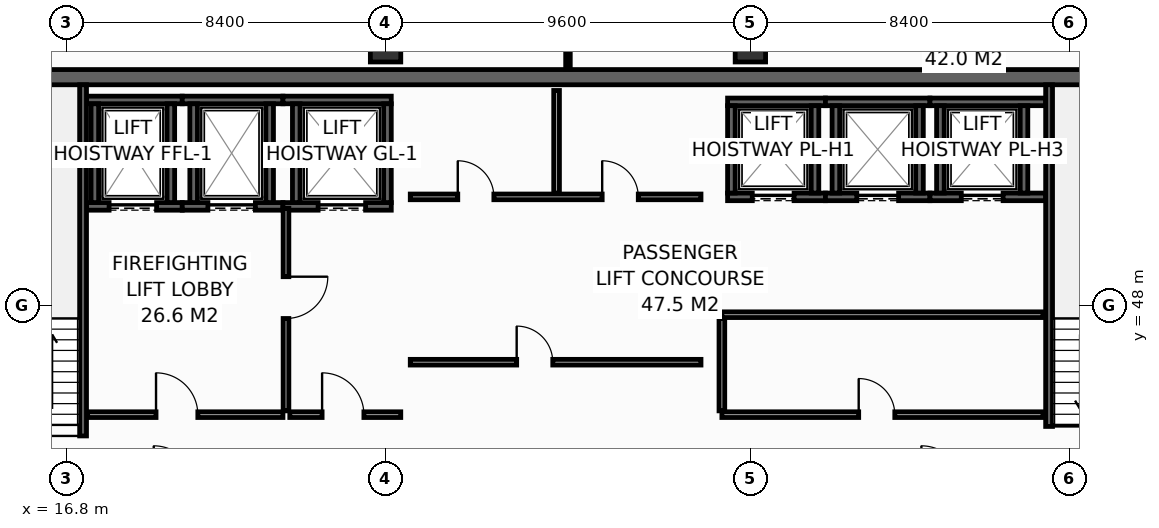
"""IFC4 building model, lengths in metres.
Left out: names, types, materials, properties, quantities, classifications, styles, units other than length and angle.
Written with IfcOpenShell. Run it as: python <this file> out.ifc"""

import sys

from ifc_helpers import new_model, si_unit, direction, frame, frame_2d, origin, origin_2d, place, context, subcontext, project, spatial, rectangle, hollow_rectangle, extrude, element, fill, save


model = new_model("IFC4")
c1 = context("Model", 3, precision=1e-05, world=origin(), true_north=direction((0.0, 1.0)))
c2 = subcontext(c1, "Body", "Model", "MODEL_VIEW")
j1 = project(units=[si_unit("LENGTHUNIT", "METRE"), si_unit("PLANEANGLEUNIT", "RADIAN")], contexts=[c1])
p1 = place(None, origin())
s1 = spatial("IfcSite", under=j1, at=p1, CompositionType="ELEMENT")
p2 = place(p1, origin())
s2 = spatial("IfcBuilding", under=s1, at=p2, CompositionType="ELEMENT")
p3 = place(p2, frame((0.0, 0.0, 245.8)))
s3 = spatial("IfcBuildingStorey", under=s2, at=p3, CompositionType="ELEMENT", Elevation=245.8)
p4 = place(p3, frame((13.7, 54.0, 0.0), z_axis=(0.0, 0.0, 1.0), x_axis=(1.0, 0.0, 0.0)))
e1 = element("IfcWall", 1, at=p4, inside=s3, PredefinedType="SHEAR", context=c2, shape_type="SweptSolid", body=[
    extrude(rectangle(XDim=32.5, YDim=0.4, at=frame_2d((16.25, 0.0))), origin(), (0.0, 0.0, 1.0), 3.55),
])
for number, where, z_axis, x_axis in (
    (2, (25.2, 54.8, 0.0), (0.0, 0.0, 1.0), (1.0, 0.0, 0.0)),
    (3, (34.8, 54.8, 0.0), (0.0, 0.0, 1.0), (1.0, 0.0, 0.0)),
):
    element("IfcColumn", number, at=place(p3, frame(where, z_axis=z_axis, x_axis=x_axis)), inside=s3, PredefinedType="COLUMN", context=c2, shape_type="SweptSolid", body=[
        extrude(hollow_rectangle(XDim=0.8, YDim=0.8, WallThickness=0.036, at=origin_2d()), origin(), (0.0, 0.0, 1.0), 3.8),
    ])
p5 = place(p3, frame((17.33, 50.6, 0.0), z_axis=(0.0, 0.0, 1.0), x_axis=(1.0, 0.0, 0.0)))
e4 = element("IfcWall", 4, at=p5, inside=s3, PredefinedType="SHEAR", context=c2, shape_type="SweptSolid", body=[
    extrude(rectangle(XDim=2.52, YDim=0.2, at=frame_2d((1.26, 0.0))), origin(), (0.0, 0.0, 1.0), 3.55),
])
p6 = place(p5, frame((0.595, 0.0, 0.0)))
e5 = element("IfcOpeningElement", 5, at=p6, cuts=e4, PredefinedType="OPENING", context=c2, shape_type="SweptSolid", body=[
    extrude(rectangle(XDim=1.25, YDim=2.3, at=frame_2d((0.625, 1.15))), frame((0.0, 0.11, 0.0), z_axis=(0.0, -1.0, 0.0), x_axis=(1.0, 0.0, 0.0)), (0.0, 0.0, 1.0), 0.22),
])
p7 = place(p3, frame((17.33, 53.4, 0.0), z_axis=(0.0, 0.0, 1.0), x_axis=(1.0, 0.0, 0.0)))
e6 = element("IfcWall", 6, at=p7, inside=s3, PredefinedType="SHEAR", context=c2, shape_type="SweptSolid", body=[
    extrude(rectangle(XDim=2.52, YDim=0.2, at=frame_2d((1.26, 0.0))), origin(), (0.0, 0.0, 1.0), 3.55),
])
for number, where, z_axis, x_axis in (
    (7, (17.55, 50.7, 0.0), (0.0, 0.0, 1.0), (0.0, 1.0, 0.0)),
    (8, (19.55, 50.7, 0.0), (0.0, 0.0, 1.0), (0.0, 1.0, 0.0)),
):
    element("IfcWall", number, at=place(p3, frame(where, z_axis=z_axis, x_axis=x_axis)), inside=s3, PredefinedType="SHEAR", context=c2, shape_type="SweptSolid", body=[
        extrude(rectangle(XDim=2.6, YDim=0.2, at=frame_2d((1.3, 0.0))), origin(), (0.0, 0.0, 1.0), 3.55),
    ])
p8 = place(p3, frame((19.85, 50.6, 0.0), z_axis=(0.0, 0.0, 1.0), x_axis=(1.0, 0.0, 0.0)))
e9 = element("IfcWall", 9, at=p8, inside=s3, PredefinedType="SHEAR", context=c2, shape_type="SweptSolid", body=[
    extrude(rectangle(XDim=2.65, YDim=0.2, at=frame_2d((1.325, 0.0))), origin(), (0.0, 0.0, 1.0), 3.55),
])
p9 = place(p8, frame((0.675, 0.0, 0.0)))
e10 = element("IfcOpeningElement", 10, at=p9, cuts=e9, PredefinedType="OPENING", context=c2, shape_type="SweptSolid", body=[
    extrude(rectangle(XDim=1.25, YDim=2.3, at=frame_2d((0.625, 1.15))), frame((0.0, 0.11, 0.0), z_axis=(0.0, -1.0, 0.0), x_axis=(1.0, 0.0, 0.0)), (0.0, 0.0, 1.0), 0.22),
])
p10 = place(p3, frame((19.85, 53.4, 0.0), z_axis=(0.0, 0.0, 1.0), x_axis=(1.0, 0.0, 0.0)))
e11 = element("IfcWall", 11, at=p10, inside=s3, PredefinedType="SHEAR", context=c2, shape_type="SweptSolid", body=[
    extrude(rectangle(XDim=2.65, YDim=0.2, at=frame_2d((1.325, 0.0))), origin(), (0.0, 0.0, 1.0), 3.55),
])
for number, where, z_axis, x_axis in (
    (12, (20.15, 50.7, 0.0), (0.0, 0.0, 1.0), (0.0, 1.0, 0.0)),
    (13, (22.15, 50.7, 0.0), (0.0, 0.0, 1.0), (0.0, 1.0, 0.0)),
):
    element("IfcWall", number, at=place(p3, frame(where, z_axis=z_axis, x_axis=x_axis)), inside=s3, PredefinedType="SHEAR", context=c2, shape_type="SweptSolid", body=[
        extrude(rectangle(XDim=2.6, YDim=0.2, at=frame_2d((1.3, 0.0))), origin(), (0.0, 0.0, 1.0), 3.55),
    ])
p11 = place(p3, frame((22.5, 50.6, 0.0), z_axis=(0.0, 0.0, 1.0), x_axis=(1.0, 0.0, 0.0)))
e14 = element("IfcWall", 14, at=p11, inside=s3, PredefinedType="SHEAR", context=c2, shape_type="SweptSolid", body=[
    extrude(rectangle(XDim=2.85, YDim=0.2, at=frame_2d((1.425, 0.0))), origin(), (0.0, 0.0, 1.0), 3.55),
])
p12 = place(p11, frame((0.925, 0.0, 0.0)))
e15 = element("IfcOpeningElement", 15, at=p12, cuts=e14, PredefinedType="OPENING", context=c2, shape_type="SweptSolid", body=[
    extrude(rectangle(XDim=1.25, YDim=2.3, at=frame_2d((0.625, 1.15))), frame((0.0, 0.11, 0.0), z_axis=(0.0, -1.0, 0.0), x_axis=(1.0, 0.0, 0.0)), (0.0, 0.0, 1.0), 0.22),
])
p13 = place(p3, frame((22.5, 53.4, 0.0), z_axis=(0.0, 0.0, 1.0), x_axis=(1.0, 0.0, 0.0)))
e16 = element("IfcWall", 16, at=p13, inside=s3, PredefinedType="SHEAR", context=c2, shape_type="SweptSolid", body=[
    extrude(rectangle(XDim=2.85, YDim=0.2, at=frame_2d((1.425, 0.0))), origin(), (0.0, 0.0, 1.0), 3.55),
])
for number, where, z_axis, x_axis in (
    (17, (22.85, 50.7, 0.0), (0.0, 0.0, 1.0), (0.0, 1.0, 0.0)),
    (18, (25.25, 50.7, 0.0), (0.0, 0.0, 1.0), (0.0, 1.0, 0.0)),
):
    element("IfcWall", number, at=place(p3, frame(where, z_axis=z_axis, x_axis=x_axis)), inside=s3, PredefinedType="SHEAR", context=c2, shape_type="SweptSolid", body=[
        extrude(rectangle(XDim=2.6, YDim=0.2, at=frame_2d((1.3, 0.0))), origin(), (0.0, 0.0, 1.0), 3.55),
    ])
p14 = place(p3, frame((34.2, 50.85, 0.0), z_axis=(0.0, 0.0, 1.0), x_axis=(1.0, 0.0, 0.0)))
e19 = element("IfcWall", 19, at=p14, inside=s3, PredefinedType="SHEAR", context=c2, shape_type="SweptSolid", body=[
    extrude(rectangle(XDim=2.575, YDim=0.2, at=frame_2d((1.288, 0.0))), origin(), (0.0, 0.0, 1.0), 3.55),
])
p15 = place(p14, frame((0.65, 0.0, 0.0)))
e20 = element("IfcOpeningElement", 20, at=p15, cuts=e19, PredefinedType="OPENING", context=c2, shape_type="SweptSolid", body=[
    extrude(rectangle(XDim=1.1, YDim=2.2, at=frame_2d((0.55, 1.1))), frame((0.0, 0.11, 0.0), z_axis=(0.0, -1.0, 0.0), x_axis=(1.0, 0.0, 0.0)), (0.0, 0.0, 1.0), 0.22),
])
p16 = place(p3, frame((34.2, 53.35, 0.0), z_axis=(0.0, 0.0, 1.0), x_axis=(1.0, 0.0, 0.0)))
e21 = element("IfcWall", 21, at=p16, inside=s3, PredefinedType="SHEAR", context=c2, shape_type="SweptSolid", body=[
    extrude(rectangle(XDim=2.575, YDim=0.2, at=frame_2d((1.288, 0.0))), origin(), (0.0, 0.0, 1.0), 3.55),
])
for number, where, z_axis, x_axis in (
    (22, (34.3, 50.95, 0.0), (0.0, 0.0, 1.0), (0.0, 1.0, 0.0)),
    (23, (36.5, 50.95, 0.0), (0.0, 0.0, 1.0), (0.0, 1.0, 0.0)),
):
    element("IfcWall", number, at=place(p3, frame(where, z_axis=z_axis, x_axis=x_axis)), inside=s3, PredefinedType="SHEAR", context=c2, shape_type="SweptSolid", body=[
        extrude(rectangle(XDim=2.3, YDim=0.2, at=frame_2d((1.15, 0.0))), origin(), (0.0, 0.0, 1.0), 3.55),
    ])
p17 = place(p3, frame((36.775, 50.85, 0.0), z_axis=(0.0, 0.0, 1.0), x_axis=(1.0, 0.0, 0.0)))
e24 = element("IfcWall", 24, at=p17, inside=s3, PredefinedType="SHEAR", context=c2, shape_type="SweptSolid", body=[
    extrude(rectangle(XDim=2.75, YDim=0.2, at=frame_2d((1.375, 0.0))), origin(), (0.0, 0.0, 1.0), 3.55),
])
p18 = place(p17, frame((0.825, 0.0, 0.0)))
e25 = element("IfcOpeningElement", 25, at=p18, cuts=e24, PredefinedType="OPENING", context=c2, shape_type="SweptSolid", body=[
    extrude(rectangle(XDim=1.1, YDim=2.2, at=frame_2d((0.55, 1.1))), frame((0.0, 0.11, 0.0), z_axis=(0.0, -1.0, 0.0), x_axis=(1.0, 0.0, 0.0)), (0.0, 0.0, 1.0), 0.22),
])
p19 = place(p3, frame((36.775, 53.35, 0.0), z_axis=(0.0, 0.0, 1.0), x_axis=(1.0, 0.0, 0.0)))
e26 = element("IfcWall", 26, at=p19, inside=s3, PredefinedType="SHEAR", context=c2, shape_type="SweptSolid", body=[
    extrude(rectangle(XDim=2.75, YDim=0.2, at=frame_2d((1.375, 0.0))), origin(), (0.0, 0.0, 1.0), 3.55),
])
for number, where, z_axis, x_axis in (
    (27, (37.05, 50.95, 0.0), (0.0, 0.0, 1.0), (0.0, 1.0, 0.0)),
    (28, (39.25, 50.95, 0.0), (0.0, 0.0, 1.0), (0.0, 1.0, 0.0)),
):
    element("IfcWall", number, at=place(p3, frame(where, z_axis=z_axis, x_axis=x_axis)), inside=s3, PredefinedType="SHEAR", context=c2, shape_type="SweptSolid", body=[
        extrude(rectangle(XDim=2.3, YDim=0.2, at=frame_2d((1.15, 0.0))), origin(), (0.0, 0.0, 1.0), 3.55),
    ])
p20 = place(p3, frame((39.525, 50.85, 0.0), z_axis=(0.0, 0.0, 1.0), x_axis=(1.0, 0.0, 0.0)))
e29 = element("IfcWall", 29, at=p20, inside=s3, PredefinedType="SHEAR", context=c2, shape_type="SweptSolid", body=[
    extrude(rectangle(XDim=3.045, YDim=0.2, at=frame_2d((1.522, 0.0))), origin(), (0.0, 0.0, 1.0), 3.55),
])
p21 = place(p20, frame((0.825, 0.0, 0.0)))
e30 = element("IfcOpeningElement", 30, at=p21, cuts=e29, PredefinedType="OPENING", context=c2, shape_type="SweptSolid", body=[
    extrude(rectangle(XDim=1.1, YDim=2.2, at=frame_2d((0.55, 1.1))), frame((0.0, 0.11, 0.0), z_axis=(0.0, -1.0, 0.0), x_axis=(1.0, 0.0, 0.0)), (0.0, 0.0, 1.0), 0.22),
])
p22 = place(p3, frame((39.525, 53.35, 0.0), z_axis=(0.0, 0.0, 1.0), x_axis=(1.0, 0.0, 0.0)))
e31 = element("IfcWall", 31, at=p22, inside=s3, PredefinedType="SHEAR", context=c2, shape_type="SweptSolid", body=[
    extrude(rectangle(XDim=3.045, YDim=0.2, at=frame_2d((1.522, 0.0))), origin(), (0.0, 0.0, 1.0), 3.55),
])
for number, where, z_axis, x_axis in (
    (32, (39.8, 50.95, 0.0), (0.0, 0.0, 1.0), (0.0, 1.0, 0.0)),
    (33, (42.0, 50.95, 0.0), (0.0, 0.0, 1.0), (0.0, 1.0, 0.0)),
):
    element("IfcWall", number, at=place(p3, frame(where, z_axis=z_axis, x_axis=x_axis)), inside=s3, PredefinedType="SHEAR", context=c2, shape_type="SweptSolid", body=[
        extrude(rectangle(XDim=2.3, YDim=0.2, at=frame_2d((1.15, 0.0))), origin(), (0.0, 0.0, 1.0), 3.55),
    ])
p23 = place(p3, frame((17.24, 43.4, 0.0), z_axis=(0.0, 0.0, 1.0), x_axis=(0.0, 1.0, 0.0)))
e34 = element("IfcWall", 34, at=p23, inside=s3, PredefinedType="SHEAR", context=c2, shape_type="SweptSolid", body=[
    extrude(rectangle(XDim=10.4, YDim=0.18, at=frame_2d((5.2, 0.0))), origin(), (0.0, 0.0, 1.0), 3.55),
])
p24 = place(p23, frame((0.16, 0.0, 0.0)))
e35 = element("IfcOpeningElement", 35, at=p24, cuts=e34, PredefinedType="OPENING", context=c2, shape_type="SweptSolid", body=[
    extrude(rectangle(XDim=1.0, YDim=2.15, at=frame_2d((0.5, 1.075))), frame((0.0, 0.1, 0.0), z_axis=(0.0, -1.0, 0.0), x_axis=(1.0, 0.0, 0.0)), (0.0, 0.0, 1.0), 0.2),
])
p25 = place(p3, frame((42.66, 53.8, 0.0), z_axis=(0.0, 0.0, 1.0), x_axis=(0.0, -1.0, 0.0)))
e36 = element("IfcWall", 36, at=p25, inside=s3, PredefinedType="SHEAR", context=c2, shape_type="SweptSolid", body=[
    extrude(rectangle(XDim=10.4, YDim=0.18, at=frame_2d((5.2, 0.0))), origin(), (0.0, 0.0, 1.0), 3.55),
])
p26 = place(p25, frame((8.99, 0.0, 0.0)))
e37 = element("IfcOpeningElement", 37, at=p26, cuts=e36, PredefinedType="OPENING", context=c2, shape_type="SweptSolid", body=[
    extrude(rectangle(XDim=1.1, YDim=2.15, at=frame_2d((0.55, 1.075))), frame((0.0, 0.1, 0.0), z_axis=(0.0, -1.0, 0.0), x_axis=(1.0, 0.0, 0.0)), (0.0, 0.0, 1.0), 0.2),
])
p27 = place(p3, frame((17.36, 45.12, 0.0), z_axis=(0.0, 0.0, 1.0), x_axis=(1.0, 0.0, 0.0)))
e38 = element("IfcWall", 38, at=p27, inside=s3, PredefinedType="PARTITIONING", context=c2, shape_type="SweptSolid", body=[
    extrude(rectangle(XDim=5.14, YDim=0.15, at=frame_2d((2.57, 0.0))), origin(), (0.0, 0.0, 1.0), 3.55),
])
p28 = place(p27, frame((1.8, 0.0, 0.0)))
e39 = element("IfcOpeningElement", 39, at=p28, cuts=e38, PredefinedType="OPENING", context=c2, shape_type="SweptSolid", body=[
    extrude(rectangle(XDim=1.1, YDim=2.15, at=frame_2d((0.55, 1.075))), frame((0.0, 0.085, 0.0), z_axis=(0.0, -1.0, 0.0), x_axis=(1.0, 0.0, 0.0)), (0.0, 0.0, 1.0), 0.17),
])
p29 = place(p3, frame((22.58, 50.55, 0.0), z_axis=(0.0, 0.0, 1.0), x_axis=(0.0, -1.0, 0.0)))
e40 = element("IfcWall", 40, at=p29, inside=s3, PredefinedType="PARTITIONING", context=c2, shape_type="SweptSolid", body=[
    extrude(rectangle(XDim=5.33, YDim=0.15, at=frame_2d((2.665, 0.0))), origin(), (0.0, 0.0, 1.0), 3.55),
])
p30 = place(p29, frame((1.8, 0.0, 0.0)))
e41 = element("IfcOpeningElement", 41, at=p30, cuts=e40, PredefinedType="OPENING", context=c2, shape_type="SweptSolid", body=[
    extrude(rectangle(XDim=1.1, YDim=2.15, at=frame_2d((0.55, 1.075))), frame((0.0, 0.085, 0.0), z_axis=(0.0, -1.0, 0.0), x_axis=(1.0, 0.0, 0.0)), (0.0, 0.0, 1.0), 0.17),
])
p31 = place(p3, frame((22.68, 45.12, 0.0), z_axis=(0.0, 0.0, 1.0), x_axis=(1.0, 0.0, 0.0)))
e42 = element("IfcWall", 42, at=p31, inside=s3, PredefinedType="PARTITIONING", context=c2, shape_type="SweptSolid", body=[
    extrude(rectangle(XDim=2.92, YDim=0.15, at=frame_2d((1.46, 0.0))), origin(), (0.0, 0.0, 1.0), 3.55),
])
p32 = place(p31, frame((0.85, 0.0, 0.0)))
e43 = element("IfcOpeningElement", 43, at=p32, cuts=e42, PredefinedType="OPENING", context=c2, shape_type="SweptSolid", body=[
    extrude(rectangle(XDim=1.1, YDim=2.15, at=frame_2d((0.55, 1.075))), frame((0.0, 0.085, 0.0), z_axis=(0.0, -1.0, 0.0), x_axis=(1.0, 0.0, 0.0)), (0.0, 0.0, 1.0), 0.17),
])
p33 = place(p3, frame((34.05, 45.12, 0.0), z_axis=(0.0, 0.0, 1.0), x_axis=(1.0, 0.0, 0.0)))
e44 = element("IfcWall", 44, at=p33, inside=s3, PredefinedType="PARTITIONING", context=c2, shape_type="SweptSolid", body=[
    extrude(rectangle(XDim=8.45, YDim=0.15, at=frame_2d((4.225, 0.0))), origin(), (0.0, 0.0, 1.0), 3.55),
])
p34 = place(p33, frame((3.6, 0.0, 0.0)))
e45 = element("IfcOpeningElement", 45, at=p34, cuts=e44, PredefinedType="OPENING", context=c2, shape_type="SweptSolid", body=[
    extrude(rectangle(XDim=0.95, YDim=2.15, at=frame_2d((0.475, 1.075))), frame((0.0, 0.085, 0.0), z_axis=(0.0, -1.0, 0.0), x_axis=(1.0, 0.0, 0.0)), (0.0, 0.0, 1.0), 0.17),
])
p35 = place(p3, frame((34.05, 47.75, 0.0), z_axis=(0.0, 0.0, 1.0), x_axis=(1.0, 0.0, 0.0)))
e46 = element("IfcWall", 46, at=p35, inside=s3, PredefinedType="PARTITIONING", context=c2, shape_type="SweptSolid", body=[
    extrude(rectangle(XDim=8.45, YDim=0.15, at=frame_2d((4.225, 0.0))), origin(), (0.0, 0.0, 1.0), 3.55),
])
p36 = place(p3, frame((34.05, 45.22, 0.0), z_axis=(0.0, 0.0, 1.0), x_axis=(0.0, 1.0, 0.0)))
e47 = element("IfcWall", 47, at=p36, inside=s3, PredefinedType="PARTITIONING", context=c2, shape_type="SweptSolid", body=[
    extrude(rectangle(XDim=2.43, YDim=0.15, at=frame_2d((1.215, 0.0))), origin(), (0.0, 0.0, 1.0), 3.55),
])
p37 = place(p3, frame((25.85, 50.85, 0.0), z_axis=(0.0, 0.0, 1.0), x_axis=(1.0, 0.0, 0.0)))
e48 = element("IfcWall", 48, at=p37, inside=s3, PredefinedType="PARTITIONING", context=c2, shape_type="SweptSolid", body=[
    extrude(rectangle(XDim=7.65, YDim=0.15, at=frame_2d((3.825, 0.0))), origin(), (0.0, 0.0, 1.0), 3.55),
])
p38 = place(p37, frame((1.25, 0.0, 0.0)))
e49 = element("IfcOpeningElement", 49, at=p38, cuts=e48, PredefinedType="OPENING", context=c2, shape_type="SweptSolid", body=[
    extrude(rectangle(XDim=0.95, YDim=2.15, at=frame_2d((0.475, 1.075))), frame((0.0, 0.085, 0.0), z_axis=(0.0, -1.0, 0.0), x_axis=(1.0, 0.0, 0.0)), (0.0, 0.0, 1.0), 0.17),
])
p39 = place(p37, frame((5.05, 0.0, 0.0)))
e50 = element("IfcOpeningElement", 50, at=p39, cuts=e48, PredefinedType="OPENING", context=c2, shape_type="SweptSolid", body=[
    extrude(rectangle(XDim=0.95, YDim=2.15, at=frame_2d((0.475, 1.075))), frame((0.0, 0.085, 0.0), z_axis=(0.0, -1.0, 0.0), x_axis=(1.0, 0.0, 0.0)), (0.0, 0.0, 1.0), 0.17),
])
p40 = place(p3, frame((29.7, 50.95, 0.0), z_axis=(0.0, 0.0, 1.0), x_axis=(0.0, 1.0, 0.0)))
e51 = element("IfcWall", 51, at=p40, inside=s3, PredefinedType="PARTITIONING", context=c2, shape_type="SweptSolid", body=[
    extrude(rectangle(XDim=2.7, YDim=0.15, at=frame_2d((1.35, 0.0))), origin(), (0.0, 0.0, 1.0), 3.55),
])
p41 = place(p3, frame((25.85, 46.5, 0.0), z_axis=(0.0, 0.0, 1.0), x_axis=(1.0, 0.0, 0.0)))
e52 = element("IfcWall", 52, at=p41, inside=s3, PredefinedType="PARTITIONING", context=c2, shape_type="SweptSolid", body=[
    extrude(rectangle(XDim=7.65, YDim=0.15, at=frame_2d((3.825, 0.0))), origin(), (0.0, 0.0, 1.0), 3.55),
])
p42 = place(p41, frame((2.8, 0.0, 0.0)))
e53 = element("IfcOpeningElement", 53, at=p42, cuts=e52, PredefinedType="OPENING", context=c2, shape_type="SweptSolid", body=[
    extrude(rectangle(XDim=0.95, YDim=2.15, at=frame_2d((0.475, 1.075))), frame((0.0, 0.085, 0.0), z_axis=(0.0, -1.0, 0.0), x_axis=(1.0, 0.0, 0.0)), (0.0, 0.0, 1.0), 0.17),
])
p43 = place(p3, frame((30.0, 54.22, 0.0), z_axis=(0.0, 0.0, 1.0), x_axis=(0.0, 1.0, 0.0)))
e54 = element("IfcWall", 54, at=p43, inside=s3, PredefinedType="PARTITIONING", context=c2, shape_type="SweptSolid", body=[
    extrude(rectangle(XDim=1.775, YDim=0.12, at=frame_2d((0.888, 0.0))), origin(), (0.0, 0.0, 1.0), 2.935),
])
p44 = place(p6, origin())
e55 = element("IfcDoor", 55, at=p44, inside=s3, OperationType="SLIDING_TO_LEFT", PredefinedType="DOOR", context=c2, shape_type="SweptSolid", body=[
    extrude(rectangle(XDim=1.25, YDim=2.3, at=frame_2d((0.625, 1.15))), frame((0.0, 0.025, 0.0), z_axis=(0.0, -1.0, 0.0), x_axis=(1.0, 0.0, 0.0)), (0.0, 0.0, 1.0), 0.05),
])
fill(e5, e55)
p45 = place(p9, origin())
e56 = element("IfcDoor", 56, at=p45, inside=s3, OperationType="SLIDING_TO_LEFT", PredefinedType="DOOR", context=c2, shape_type="SweptSolid", body=[
    extrude(rectangle(XDim=1.25, YDim=2.3, at=frame_2d((0.625, 1.15))), frame((0.0, 0.025, 0.0), z_axis=(0.0, -1.0, 0.0), x_axis=(1.0, 0.0, 0.0)), (0.0, 0.0, 1.0), 0.05),
])
fill(e10, e56)
p46 = place(p12, origin())
e57 = element("IfcDoor", 57, at=p46, inside=s3, OperationType="SLIDING_TO_LEFT", PredefinedType="DOOR", context=c2, shape_type="SweptSolid", body=[
    extrude(rectangle(XDim=1.25, YDim=2.3, at=frame_2d((0.625, 1.15))), frame((0.0, 0.025, 0.0), z_axis=(0.0, -1.0, 0.0), x_axis=(1.0, 0.0, 0.0)), (0.0, 0.0, 1.0), 0.05),
])
fill(e15, e57)
p47 = place(p15, origin())
e58 = element("IfcDoor", 58, at=p47, inside=s3, OperationType="SLIDING_TO_LEFT", PredefinedType="DOOR", context=c2, shape_type="SweptSolid", body=[
    extrude(rectangle(XDim=1.1, YDim=2.2, at=frame_2d((0.55, 1.1))), frame((0.0, 0.025, 0.0), z_axis=(0.0, -1.0, 0.0), x_axis=(1.0, 0.0, 0.0)), (0.0, 0.0, 1.0), 0.05),
])
fill(e20, e58)
p48 = place(p18, origin())
e59 = element("IfcDoor", 59, at=p48, inside=s3, OperationType="SLIDING_TO_LEFT", PredefinedType="DOOR", context=c2, shape_type="SweptSolid", body=[
    extrude(rectangle(XDim=1.1, YDim=2.2, at=frame_2d((0.55, 1.1))), frame((0.0, 0.025, 0.0), z_axis=(0.0, -1.0, 0.0), x_axis=(1.0, 0.0, 0.0)), (0.0, 0.0, 1.0), 0.05),
])
fill(e25, e59)
p49 = place(p21, origin())
e60 = element("IfcDoor", 60, at=p49, inside=s3, OperationType="SLIDING_TO_LEFT", PredefinedType="DOOR", context=c2, shape_type="SweptSolid", body=[
    extrude(rectangle(XDim=1.1, YDim=2.2, at=frame_2d((0.55, 1.1))), frame((0.0, 0.025, 0.0), z_axis=(0.0, -1.0, 0.0), x_axis=(1.0, 0.0, 0.0)), (0.0, 0.0, 1.0), 0.05),
])
fill(e30, e60)
p50 = place(p24, origin())
e61 = element("IfcDoor", 61, at=p50, inside=s3, OperationType="SINGLE_SWING_RIGHT", PredefinedType="DOOR", context=c2, shape_type="SweptSolid", body=[
    extrude(rectangle(XDim=1.0, YDim=2.15, at=frame_2d((0.5, 1.075))), frame((0.0, 0.025, 0.0), z_axis=(0.0, -1.0, 0.0), x_axis=(1.0, 0.0, 0.0)), (0.0, 0.0, 1.0), 0.05),
])
fill(e35, e61)
p51 = place(p26, origin())
e62 = element("IfcDoor", 62, at=p51, inside=s3, OperationType="SINGLE_SWING_LEFT", PredefinedType="DOOR", context=c2, shape_type="SweptSolid", body=[
    extrude(rectangle(XDim=1.1, YDim=2.15, at=frame_2d((0.55, 1.075))), frame((0.0, 0.025, 0.0), z_axis=(0.0, -1.0, 0.0), x_axis=(1.0, 0.0, 0.0)), (0.0, 0.0, 1.0), 0.05),
])
fill(e37, e62)
p52 = place(p28, origin())
e63 = element("IfcDoor", 63, at=p52, inside=s3, OperationType="SINGLE_SWING_LEFT", PredefinedType="DOOR", context=c2, shape_type="SweptSolid", body=[
    extrude(rectangle(XDim=1.1, YDim=2.15, at=frame_2d((0.55, 1.075))), frame((0.0, 0.025, 0.0), z_axis=(0.0, -1.0, 0.0), x_axis=(1.0, 0.0, 0.0)), (0.0, 0.0, 1.0), 0.05),
])
fill(e39, e63)
p53 = place(p30, origin())
e64 = element("IfcDoor", 64, at=p53, inside=s3, OperationType="SINGLE_SWING_LEFT", PredefinedType="DOOR", context=c2, shape_type="SweptSolid", body=[
    extrude(rectangle(XDim=1.1, YDim=2.15, at=frame_2d((0.55, 1.075))), frame((0.0, 0.025, 0.0), z_axis=(0.0, -1.0, 0.0), x_axis=(1.0, 0.0, 0.0)), (0.0, 0.0, 1.0), 0.05),
])
fill(e41, e64)
p54 = place(p32, origin())
e65 = element("IfcDoor", 65, at=p54, inside=s3, OperationType="SINGLE_SWING_LEFT", PredefinedType="DOOR", context=c2, shape_type="SweptSolid", body=[
    extrude(rectangle(XDim=1.1, YDim=2.15, at=frame_2d((0.55, 1.075))), frame((0.0, 0.025, 0.0), z_axis=(0.0, -1.0, 0.0), x_axis=(1.0, 0.0, 0.0)), (0.0, 0.0, 1.0), 0.05),
])
fill(e43, e65)
p55 = place(p34, origin())
e66 = element("IfcDoor", 66, at=p55, inside=s3, OperationType="SINGLE_SWING_LEFT", PredefinedType="DOOR", context=c2, shape_type="SweptSolid", body=[
    extrude(rectangle(XDim=0.95, YDim=2.15, at=frame_2d((0.475, 1.075))), frame((0.0, 0.025, 0.0), z_axis=(0.0, -1.0, 0.0), x_axis=(1.0, 0.0, 0.0)), (0.0, 0.0, 1.0), 0.05),
])
fill(e45, e66)
p56 = place(p38, origin())
e67 = element("IfcDoor", 67, at=p56, inside=s3, OperationType="SINGLE_SWING_LEFT", PredefinedType="DOOR", context=c2, shape_type="SweptSolid", body=[
    extrude(rectangle(XDim=0.95, YDim=2.15, at=frame_2d((0.475, 1.075))), frame((0.0, 0.025, 0.0), z_axis=(0.0, -1.0, 0.0), x_axis=(1.0, 0.0, 0.0)), (0.0, 0.0, 1.0), 0.05),
])
fill(e49, e67)
p57 = place(p39, origin())
e68 = element("IfcDoor", 68, at=p57, inside=s3, OperationType="SINGLE_SWING_LEFT", PredefinedType="DOOR", context=c2, shape_type="SweptSolid", body=[
    extrude(rectangle(XDim=0.95, YDim=2.15, at=frame_2d((0.475, 1.075))), frame((0.0, 0.025, 0.0), z_axis=(0.0, -1.0, 0.0), x_axis=(1.0, 0.0, 0.0)), (0.0, 0.0, 1.0), 0.05),
])
fill(e50, e68)
p58 = place(p42, origin())
e69 = element("IfcDoor", 69, at=p58, inside=s3, OperationType="SINGLE_SWING_LEFT", PredefinedType="DOOR", context=c2, shape_type="SweptSolid", body=[
    extrude(rectangle(XDim=0.95, YDim=2.15, at=frame_2d((0.475, 1.075))), frame((0.0, 0.025, 0.0), z_axis=(0.0, -1.0, 0.0), x_axis=(1.0, 0.0, 0.0)), (0.0, 0.0, 1.0), 0.05),
])
fill(e53, e69)
save(model, sys.argv[1])
